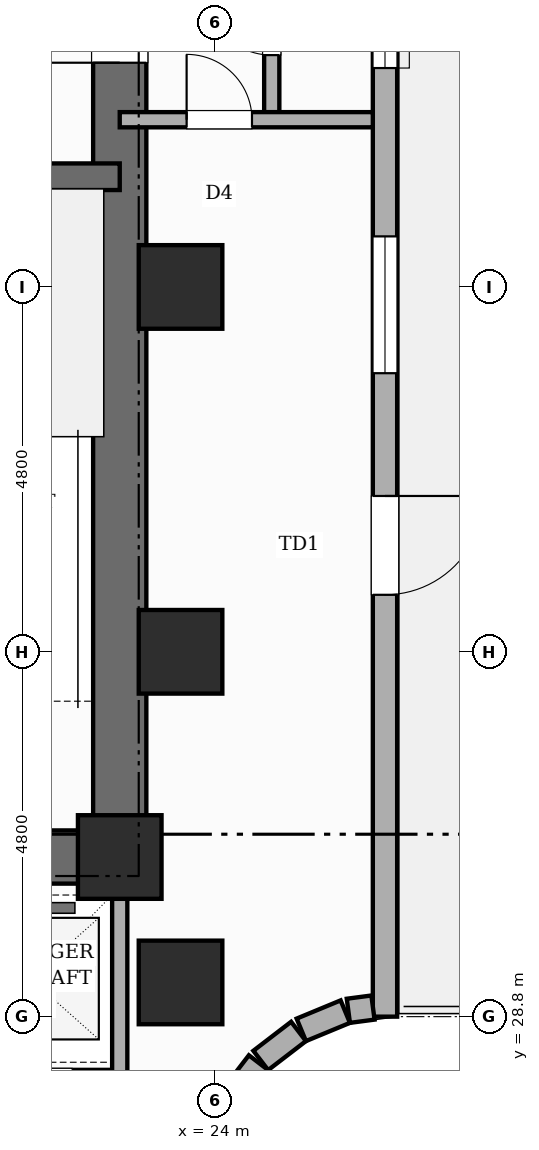
"""IFC4 building model, lengths in metres.
Left out: names, types, materials, properties, quantities, classifications, styles, units other than length and angle.
Written with IfcOpenShell. Run it as: python <this file> out.ifc"""

import sys

from ifc_helpers import new_model, si_unit, direction, frame, frame_2d, origin, origin_2d, place, context, subcontext, project, spatial, rectangle, extrude, element, fill, save


model = new_model("IFC4")
c1 = context("Model", 3, precision=1e-05, world=origin(), true_north=direction((0.0, 1.0)))
c2 = subcontext(c1, "Body", "Model", "MODEL_VIEW")
j1 = project(units=[si_unit("LENGTHUNIT", "METRE"), si_unit("PLANEANGLEUNIT", "RADIAN")], contexts=[c1])
p1 = place(None, origin())
s1 = spatial("IfcSite", under=j1, at=p1, CompositionType="ELEMENT")
p2 = place(p1, origin())
s2 = spatial("IfcBuilding", under=s1, at=p2, CompositionType="ELEMENT")
p3 = place(p2, frame((0.0, 0.0, 97.0)))
s3 = spatial("IfcBuildingStorey", under=s2, at=p3, CompositionType="ELEMENT", Elevation=97.0)
p4 = place(p3, frame((22.75, 30.55, 0.0), z_axis=(0.0, 0.0, 1.0), x_axis=(0.0, 1.0, 0.0)))
e1 = element("IfcWall", 1, at=p4, inside=s3, PredefinedType="SHEAR", context=c2, shape_type="SweptSolid", body=[
    extrude(rectangle(XDim=15.6, YDim=0.7, at=frame_2d((7.8, 0.0))), origin(), (0.0, 0.0, 1.0), 4.8),
])
p5 = place(p4, frame((10.8, 0.0, 0.0)))
e2 = element("IfcOpeningElement", 2, at=p5, cuts=e1, PredefinedType="OPENING", context=c2, shape_type="SweptSolid", body=[
    extrude(rectangle(XDim=1.0, YDim=2.15, at=frame_2d((0.5, 1.075))), frame((0.0, 0.36, 0.0), z_axis=(0.0, -1.0, 0.0), x_axis=(1.0, 0.0, 0.0)), (0.0, 0.0, 1.0), 0.72),
])
p6 = place(p3, frame((18.84, 30.9, 0.0), z_axis=(0.0, 0.0, 1.0), x_axis=(1.0, 0.0, 0.0)))
e3 = element("IfcWall", 3, at=p6, inside=s3, PredefinedType="SHEAR", context=c2, shape_type="SweptSolid", body=[
    extrude(rectangle(XDim=3.91, YDim=0.7, at=frame_2d((1.955, 0.0))), origin(), (0.0, 0.0, 1.0), 4.8),
])
p7 = place(p3, frame((18.84, 39.85, 0.0), z_axis=(0.0, 0.0, 1.0), x_axis=(1.0, 0.0, 0.0)))
e4 = element("IfcWall", 4, at=p7, inside=s3, PredefinedType="SHEAR", context=c2, shape_type="SweptSolid", body=[
    extrude(rectangle(XDim=3.91, YDim=0.35, at=frame_2d((1.955, 0.0))), origin(), (0.0, 0.0, 1.0), 4.8),
])
for number, where, z_axis, x_axis in (
    (5, (22.75, 30.9, 0.0), (0.0, 0.0, 1.0), (1.0, 0.0, 0.0)),
    (6, (23.55, 29.25, 0.0), (0.0, 0.0, 1.0), (1.0, 0.0, 0.0)),
    (7, (23.55, 33.6, 0.0), (0.0, 0.0, 1.0), (1.0, 0.0, 0.0)),
    (8, (23.55, 38.4, 0.0), (0.0, 0.0, 1.0), (1.0, 0.0, 0.0)),
):
    element("IfcColumn", number, at=place(p3, frame(where, z_axis=z_axis, x_axis=x_axis)), inside=s3, PredefinedType="COLUMN", context=c2, shape_type="SweptSolid", body=[
        extrude(rectangle(XDim=1.1, YDim=1.1, at=origin_2d()), origin(), (0.0, 0.0, 1.0), 4.8),
    ])
p8 = place(p3, frame((26.24, 43.8, 0.0), z_axis=(0.0, 0.0, 1.0), x_axis=(0.0, -1.0, 0.0)))
e9 = element("IfcWall", 9, at=p8, inside=s3, PredefinedType="STANDARD", context=c2, shape_type="SweptSolid", body=[
    extrude(rectangle(XDim=15.0, YDim=0.32, at=frame_2d((7.5, 0.0))), origin(), (0.0, 0.0, 1.0), 4.5),
])
p9 = place(p8, frame((8.15, 0.0, 0.0)))
e10 = element("IfcOpeningElement", 10, at=p9, cuts=e9, PredefinedType="OPENING", context=c2, shape_type="SweptSolid", body=[
    extrude(rectangle(XDim=1.3, YDim=2.2, at=frame_2d((0.65, 1.1))), frame((0.0, 0.17, 0.0), z_axis=(0.0, -1.0, 0.0), x_axis=(1.0, 0.0, 0.0)), (0.0, 0.0, 1.0), 0.34),
])
p10 = place(p8, frame((0.72, 0.0, 0.8)))
e11 = element("IfcOpeningElement", 11, at=p10, cuts=e9, PredefinedType="OPENING", context=c2, shape_type="SweptSolid", body=[
    extrude(rectangle(XDim=1.8, YDim=2.1, at=frame_2d((0.9, 1.05))), frame((0.0, 0.17, 0.0), z_axis=(0.0, -1.0, 0.0), x_axis=(1.0, 0.0, 0.0)), (0.0, 0.0, 1.0), 0.34),
])
p11 = place(p8, frame((4.735, 0.0, 0.8)))
e12 = element("IfcOpeningElement", 12, at=p11, cuts=e9, PredefinedType="OPENING", context=c2, shape_type="SweptSolid", body=[
    extrude(rectangle(XDim=1.8, YDim=2.1, at=frame_2d((0.9, 1.05))), frame((0.0, 0.17, 0.0), z_axis=(0.0, -1.0, 0.0), x_axis=(1.0, 0.0, 0.0)), (0.0, 0.0, 1.0), 0.34),
])
p12 = place(p3, frame((26.082, 28.919, 0.0), z_axis=(0.0, 0.0, 1.0), x_axis=(-0.991512688813, -0.130009953168, 0.0)))
e13 = element("IfcWall", 13, at=p12, inside=s3, PredefinedType="STANDARD", context=c2, shape_type="SweptSolid", body=[
    extrude(rectangle(XDim=0.327, YDim=0.32, at=frame_2d((0.163, 0.0))), origin(), (0.0, 0.0, 1.0), 4.5),
])
p13 = place(p3, frame((25.718, 28.866, 0.0), z_axis=(0.0, 0.0, 1.0), x_axis=(-0.923836271867, -0.382787856107, 0.0)))
e14 = element("IfcWall", 14, at=p13, inside=s3, PredefinedType="STANDARD", context=c2, shape_type="SweptSolid", body=[
    extrude(rectangle(XDim=0.626, YDim=0.32, at=frame_2d((0.313, 0.0))), origin(), (0.0, 0.0, 1.0), 4.5),
])
for number, where, z_axis, x_axis in (
    (15, (25.103, 28.605, 0.0), (0.0, 0.0, 1.0), (-0.793, -0.609, 0.0)),
    (16, (24.576, 28.195, 0.0), (0.0, 0.0, 1.0), (-0.609, -0.793, 0.0)),
):
    element("IfcWall", number, at=place(p3, frame(where, z_axis=z_axis, x_axis=x_axis)), inside=s3, PredefinedType="STANDARD", context=c2, shape_type="SweptSolid", body=[
        extrude(rectangle(XDim=0.626, YDim=0.32, at=frame_2d((0.313, 0.0))), origin(), (0.0, 0.0, 1.0), 4.5),
    ])
p14 = place(p3, frame((22.75, 27.9, 0.0), z_axis=(0.0, 0.0, 1.0), x_axis=(0.0, 1.0, 0.0)))
e17 = element("IfcWall", 17, at=p14, inside=s3, PredefinedType="POLYGONAL", context=c2, shape_type="SweptSolid", body=[
    extrude(rectangle(XDim=3.0, YDim=0.2, at=frame_2d((1.5, 0.0))), origin(), (0.0, 0.0, 1.0), 4.5),
])
p15 = place(p3, frame((24.75, 40.6, 0.0), z_axis=(0.0, 0.0, 1.0), x_axis=(0.0, 1.0, 0.0)))
e18 = element("IfcWall", 18, at=p15, inside=s3, PredefinedType="PARTITIONING", context=c2, shape_type="SweptSolid", body=[
    extrude(rectangle(XDim=4.2, YDim=0.2, at=frame_2d((2.1, 0.0))), origin(), (0.0, 0.0, 1.0), 4.5),
])
p16 = place(p15, frame((0.85, 0.0, 0.0)))
e19 = element("IfcOpeningElement", 19, at=p16, cuts=e18, PredefinedType="OPENING", context=c2, shape_type="SweptSolid", body=[
    extrude(rectangle(XDim=0.88, YDim=2.1, at=frame_2d((0.44, 1.05))), frame((0.0, 0.11, 0.0), z_axis=(0.0, -1.0, 0.0), x_axis=(1.0, 0.0, 0.0)), (0.0, 0.0, 1.0), 0.22),
])
p17 = place(p3, frame((22.75, 40.6, 0.0), z_axis=(0.0, 0.0, 1.0), x_axis=(1.0, 0.0, 0.0)))
e20 = element("IfcWall", 20, at=p17, inside=s3, PredefinedType="PARTITIONING", context=c2, shape_type="SweptSolid", body=[
    extrude(rectangle(XDim=3.33, YDim=0.2, at=frame_2d((1.665, 0.0))), origin(), (0.0, 0.0, 1.0), 4.5),
])
p18 = place(p17, frame((0.88, 0.0, 0.0)))
e21 = element("IfcOpeningElement", 21, at=p18, cuts=e20, PredefinedType="OPENING", context=c2, shape_type="SweptSolid", body=[
    extrude(rectangle(XDim=0.86, YDim=2.1, at=frame_2d((0.43, 1.05))), frame((0.0, 0.11, 0.0), z_axis=(0.0, -1.0, 0.0), x_axis=(1.0, 0.0, 0.0)), (0.0, 0.0, 1.0), 0.22),
])
p19 = place(p9, origin())
e22 = element("IfcDoor", 22, at=p19, inside=s3, OperationType="SINGLE_SWING_LEFT", PredefinedType="DOOR", context=c2, shape_type="SweptSolid", body=[
    extrude(rectangle(XDim=1.3, YDim=2.2, at=frame_2d((0.65, 1.1))), frame((0.0, 0.025, 0.0), z_axis=(0.0, -1.0, 0.0), x_axis=(1.0, 0.0, 0.0)), (0.0, 0.0, 1.0), 0.05),
])
fill(e10, e22)
p20 = place(p10, origin())
e23 = element("IfcWindow", 23, at=p20, inside=s3, PartitioningType="SINGLE_PANEL", PredefinedType="WINDOW", context=c2, shape_type="SweptSolid", body=[
    extrude(rectangle(XDim=1.8, YDim=2.1, at=frame_2d((0.9, 1.05))), frame((0.0, 0.03, 0.0), z_axis=(0.0, -1.0, 0.0), x_axis=(1.0, 0.0, 0.0)), (0.0, 0.0, 1.0), 0.06),
])
fill(e11, e23)
p21 = place(p11, origin())
e24 = element("IfcWindow", 24, at=p21, inside=s3, PartitioningType="SINGLE_PANEL", PredefinedType="WINDOW", context=c2, shape_type="SweptSolid", body=[
    extrude(rectangle(XDim=1.8, YDim=2.1, at=frame_2d((0.9, 1.05))), frame((0.0, 0.03, 0.0), z_axis=(0.0, -1.0, 0.0), x_axis=(1.0, 0.0, 0.0)), (0.0, 0.0, 1.0), 0.06),
])
fill(e12, e24)
p22 = place(p5, origin())
e25 = element("IfcDoor", 25, at=p22, inside=s3, OperationType="SINGLE_SWING_LEFT", PredefinedType="DOOR", context=c2, shape_type="SweptSolid", body=[
    extrude(rectangle(XDim=1.0, YDim=2.15, at=frame_2d((0.5, 1.075))), frame((0.0, 0.025, 0.0), z_axis=(0.0, -1.0, 0.0), x_axis=(1.0, 0.0, 0.0)), (0.0, 0.0, 1.0), 0.05),
])
fill(e2, e25)
p23 = place(p16, origin())
e26 = element("IfcDoor", 26, at=p23, inside=s3, OperationType="SINGLE_SWING_RIGHT", PredefinedType="DOOR", context=c2, shape_type="SweptSolid", body=[
    extrude(rectangle(XDim=0.88, YDim=2.1, at=frame_2d((0.44, 1.05))), frame((0.0, 0.025, 0.0), z_axis=(0.0, -1.0, 0.0), x_axis=(1.0, 0.0, 0.0)), (0.0, 0.0, 1.0), 0.05),
])
fill(e19, e26)
p24 = place(p18, origin())
e27 = element("IfcDoor", 27, at=p24, inside=s3, OperationType="SINGLE_SWING_LEFT", PredefinedType="DOOR", context=c2, shape_type="SweptSolid", body=[
    extrude(rectangle(XDim=0.86, YDim=2.1, at=frame_2d((0.43, 1.05))), frame((0.0, 0.025, 0.0), z_axis=(0.0, -1.0, 0.0), x_axis=(1.0, 0.0, 0.0)), (0.0, 0.0, 1.0), 0.05),
])
fill(e21, e27)
save(model, sys.argv[1])
